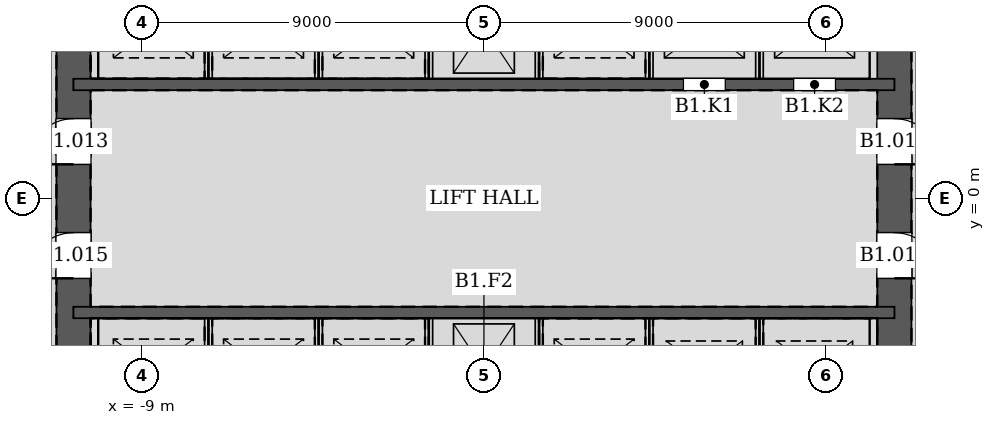
"""IFC4 building model, lengths in metres.
Left out: names, types, materials, properties, quantities, classifications, styles, units other than length and angle.
Written with IfcOpenShell. Run it as: python <this file> out.ifc"""

import sys

from ifc_helpers import new_model, si_unit, direction, frame, frame_2d, origin, place, context, subcontext, project, spatial, rectangle, extrude, element, fill, save


model = new_model("IFC4")
c1 = context("Model", 3, precision=1e-05, world=origin(), true_north=direction((0.0, 1.0)))
c2 = subcontext(c1, "Body", "Model", "MODEL_VIEW")
j1 = project(units=[si_unit("LENGTHUNIT", "METRE"), si_unit("PLANEANGLEUNIT", "RADIAN")], contexts=[c1])
p1 = place(None, origin())
s1 = spatial("IfcSite", under=j1, at=p1, CompositionType="ELEMENT")
p2 = place(p1, origin())
s2 = spatial("IfcBuilding", under=s1, at=p2, CompositionType="ELEMENT")
p3 = place(p2, frame((0.0, 0.0, -4.5)))
s3 = spatial("IfcBuildingStorey", under=s2, at=p3, CompositionType="ELEMENT", Elevation=-4.5)
p4 = place(p3, frame((10.8, -10.8, 0.0), z_axis=(0.0, 0.0, 1.0), x_axis=(0.0, 1.0, 0.0)))
e1 = element("IfcWall", 1, at=p4, inside=s3, PredefinedType="SOLIDWALL", context=c2, shape_type="SweptSolid", body=[
    extrude(rectangle(XDim=21.6, YDim=0.9, at=frame_2d((10.8, 0.0))), origin(), (0.0, 0.0, 1.0), 4.5),
])
p5 = place(p4, frame((11.7, 0.0, 0.0)))
e2 = element("IfcOpeningElement", 2, at=p5, cuts=e1, PredefinedType="OPENING", context=c2, shape_type="SweptSolid", body=[
    extrude(rectangle(XDim=1.2, YDim=2.1, at=frame_2d((0.6, 1.05))), frame((0.0, 0.46, 0.0), z_axis=(0.0, -1.0, 0.0), x_axis=(1.0, 0.0, 0.0)), (0.0, 0.0, 1.0), 0.92),
])
p6 = place(p4, frame((8.7, 0.0, 0.0)))
e3 = element("IfcOpeningElement", 3, at=p6, cuts=e1, PredefinedType="OPENING", context=c2, shape_type="SweptSolid", body=[
    extrude(rectangle(XDim=1.2, YDim=2.1, at=frame_2d((0.6, 1.05))), frame((0.0, 0.46, 0.0), z_axis=(0.0, -1.0, 0.0), x_axis=(1.0, 0.0, 0.0)), (0.0, 0.0, 1.0), 0.92),
])
p7 = place(p3, frame((-10.8, 10.8, 0.0), z_axis=(0.0, 0.0, 1.0), x_axis=(0.0, -1.0, 0.0)))
e4 = element("IfcWall", 4, at=p7, inside=s3, PredefinedType="SOLIDWALL", context=c2, shape_type="SweptSolid", body=[
    extrude(rectangle(XDim=21.6, YDim=0.9, at=frame_2d((10.8, 0.0))), origin(), (0.0, 0.0, 1.0), 4.5),
])
p8 = place(p7, frame((8.7, 0.0, 0.0)))
e5 = element("IfcOpeningElement", 5, at=p8, cuts=e4, PredefinedType="OPENING", context=c2, shape_type="SweptSolid", body=[
    extrude(rectangle(XDim=1.2, YDim=2.1, at=frame_2d((0.6, 1.05))), frame((0.0, 0.46, 0.0), z_axis=(0.0, -1.0, 0.0), x_axis=(1.0, 0.0, 0.0)), (0.0, 0.0, 1.0), 0.92),
])
p9 = place(p7, frame((11.7, 0.0, 0.0)))
e6 = element("IfcOpeningElement", 6, at=p9, cuts=e4, PredefinedType="OPENING", context=c2, shape_type="SweptSolid", body=[
    extrude(rectangle(XDim=1.2, YDim=2.1, at=frame_2d((0.6, 1.05))), frame((0.0, 0.46, 0.0), z_axis=(0.0, -1.0, 0.0), x_axis=(1.0, 0.0, 0.0)), (0.0, 0.0, 1.0), 0.92),
])
p10 = place(p3, frame((-10.8, 3.0, 0.0), z_axis=(0.0, 0.0, 1.0), x_axis=(1.0, 0.0, 0.0)))
e7 = element("IfcWall", 7, at=p10, inside=s3, PredefinedType="SOLIDWALL", context=c2, shape_type="SweptSolid", body=[
    extrude(rectangle(XDim=21.6, YDim=0.3, at=frame_2d((10.8, 0.0))), origin(), (0.0, 0.0, 1.0), 2.7),
])
p11 = place(p10, frame((16.05, 0.0, 0.0)))
e8 = element("IfcOpeningElement", 8, at=p11, cuts=e7, PredefinedType="OPENING", context=c2, shape_type="SweptSolid", body=[
    extrude(rectangle(XDim=1.1, YDim=2.1, at=frame_2d((0.55, 1.05))), frame((0.0, 0.16, 0.0), z_axis=(0.0, -1.0, 0.0), x_axis=(1.0, 0.0, 0.0)), (0.0, 0.0, 1.0), 0.32),
])
p12 = place(p10, frame((18.95, 0.0, 0.0)))
e9 = element("IfcOpeningElement", 9, at=p12, cuts=e7, PredefinedType="OPENING", context=c2, shape_type="SweptSolid", body=[
    extrude(rectangle(XDim=1.1, YDim=2.1, at=frame_2d((0.55, 1.05))), frame((0.0, 0.16, 0.0), z_axis=(0.0, -1.0, 0.0), x_axis=(1.0, 0.0, 0.0)), (0.0, 0.0, 1.0), 0.32),
])
p13 = place(p3, frame((-10.8, 3.0, 2.7), z_axis=(0.0, 0.0, 1.0), x_axis=(1.0, 0.0, 0.0)))
e10 = element("IfcWall", 10, at=p13, inside=s3, PredefinedType="SOLIDWALL", context=c2, shape_type="SweptSolid", body=[
    extrude(rectangle(XDim=21.6, YDim=0.3, at=frame_2d((10.8, 0.0))), origin(), (0.0, 0.0, 1.0), 1.8),
])
p14 = place(p3, frame((-10.8, -3.0, 0.0), z_axis=(0.0, 0.0, 1.0), x_axis=(1.0, 0.0, 0.0)))
e11 = element("IfcWall", 11, at=p14, inside=s3, PredefinedType="SOLIDWALL", context=c2, shape_type="SweptSolid", body=[
    extrude(rectangle(XDim=21.6, YDim=0.3, at=frame_2d((10.8, 0.0))), origin(), (0.0, 0.0, 1.0), 2.7),
])
p15 = place(p3, frame((-10.8, -3.0, 2.7), z_axis=(0.0, 0.0, 1.0), x_axis=(1.0, 0.0, 0.0)))
e12 = element("IfcWall", 12, at=p15, inside=s3, PredefinedType="SOLIDWALL", context=c2, shape_type="SweptSolid", body=[
    extrude(rectangle(XDim=21.6, YDim=0.3, at=frame_2d((10.8, 0.0))), origin(), (0.0, 0.0, 1.0), 1.8),
])
for number, where, z_axis, x_axis in (
    (13, (-7.25, 3.15, 0.0), (0.0, 0.0, 1.0), (0.0, 1.0, 0.0)),
    (14, (-4.35, 3.15, 0.0), (0.0, 0.0, 1.0), (0.0, 1.0, 0.0)),
    (15, (-1.45, 3.15, 0.0), (0.0, 0.0, 1.0), (0.0, 1.0, 0.0)),
    (16, (1.45, 3.15, 0.0), (0.0, 0.0, 1.0), (0.0, 1.0, 0.0)),
    (17, (4.35, 3.15, 0.0), (0.0, 0.0, 1.0), (0.0, 1.0, 0.0)),
    (18, (7.25, 3.15, 0.0), (0.0, 0.0, 1.0), (0.0, 1.0, 0.0)),
    (19, (-7.25, -5.85, 0.0), (0.0, 0.0, 1.0), (0.0, 1.0, 0.0)),
    (20, (-4.35, -5.85, 0.0), (0.0, 0.0, 1.0), (0.0, 1.0, 0.0)),
    (21, (-1.45, -5.85, 0.0), (0.0, 0.0, 1.0), (0.0, 1.0, 0.0)),
    (22, (1.45, -5.85, 0.0), (0.0, 0.0, 1.0), (0.0, 1.0, 0.0)),
    (23, (4.35, -5.85, 0.0), (0.0, 0.0, 1.0), (0.0, 1.0, 0.0)),
    (24, (7.25, -5.85, 0.0), (0.0, 0.0, 1.0), (0.0, 1.0, 0.0)),
):
    element("IfcWall", number, at=place(p3, frame(where, z_axis=z_axis, x_axis=x_axis)), inside=s3, PredefinedType="PARTITIONING", context=c2, shape_type="SweptSolid", body=[
        extrude(rectangle(XDim=2.7, YDim=0.2, at=frame_2d((1.35, 0.0))), origin(), (0.0, 0.0, 1.0), 4.5),
    ])
p16 = place(p5, frame((1.2, 0.0, 0.0), z_axis=(0.0, 0.0, 1.0), x_axis=(-1.0, 0.0, 0.0)))
e25 = element("IfcDoor", 25, at=p16, inside=s3, OperationType="SINGLE_SWING_RIGHT", PredefinedType="DOOR", context=c2, shape_type="SweptSolid", body=[
    extrude(rectangle(XDim=1.2, YDim=2.1, at=frame_2d((0.6, 1.05))), frame((0.0, 0.025, 0.0), z_axis=(0.0, -1.0, 0.0), x_axis=(1.0, 0.0, 0.0)), (0.0, 0.0, 1.0), 0.05),
])
fill(e2, e25)
p17 = place(p8, frame((1.2, 0.0, 0.0), z_axis=(0.0, 0.0, 1.0), x_axis=(-1.0, 0.0, 0.0)))
e26 = element("IfcDoor", 26, at=p17, inside=s3, OperationType="SINGLE_SWING_LEFT", PredefinedType="DOOR", context=c2, shape_type="SweptSolid", body=[
    extrude(rectangle(XDim=1.2, YDim=2.1, at=frame_2d((0.6, 1.05))), frame((0.0, 0.025, 0.0), z_axis=(0.0, -1.0, 0.0), x_axis=(1.0, 0.0, 0.0)), (0.0, 0.0, 1.0), 0.05),
])
fill(e5, e26)
p18 = place(p6, frame((1.2, 0.0, 0.0), z_axis=(0.0, 0.0, 1.0), x_axis=(-1.0, 0.0, 0.0)))
e27 = element("IfcDoor", 27, at=p18, inside=s3, OperationType="SINGLE_SWING_RIGHT", PredefinedType="DOOR", context=c2, shape_type="SweptSolid", body=[
    extrude(rectangle(XDim=1.2, YDim=2.1, at=frame_2d((0.6, 1.05))), frame((0.0, 0.025, 0.0), z_axis=(0.0, -1.0, 0.0), x_axis=(1.0, 0.0, 0.0)), (0.0, 0.0, 1.0), 0.05),
])
fill(e3, e27)
p19 = place(p9, frame((1.2, 0.0, 0.0), z_axis=(0.0, 0.0, 1.0), x_axis=(-1.0, 0.0, 0.0)))
e28 = element("IfcDoor", 28, at=p19, inside=s3, OperationType="SINGLE_SWING_LEFT", PredefinedType="DOOR", context=c2, shape_type="SweptSolid", body=[
    extrude(rectangle(XDim=1.2, YDim=2.1, at=frame_2d((0.6, 1.05))), frame((0.0, 0.025, 0.0), z_axis=(0.0, -1.0, 0.0), x_axis=(1.0, 0.0, 0.0)), (0.0, 0.0, 1.0), 0.05),
])
fill(e6, e28)
p20 = place(p11, origin())
e29 = element("IfcDoor", 29, at=p20, inside=s3, OperationType="DOUBLE_DOOR_SLIDING", PredefinedType="DOOR", context=c2, shape_type="SweptSolid", body=[
    extrude(rectangle(XDim=1.1, YDim=2.1, at=frame_2d((0.55, 1.05))), frame((0.0, 0.025, 0.0), z_axis=(0.0, -1.0, 0.0), x_axis=(1.0, 0.0, 0.0)), (0.0, 0.0, 1.0), 0.05),
])
fill(e8, e29)
p21 = place(p12, origin())
e30 = element("IfcDoor", 30, at=p21, inside=s3, OperationType="DOUBLE_DOOR_SLIDING", PredefinedType="DOOR", context=c2, shape_type="SweptSolid", body=[
    extrude(rectangle(XDim=1.1, YDim=2.1, at=frame_2d((0.55, 1.05))), frame((0.0, 0.025, 0.0), z_axis=(0.0, -1.0, 0.0), x_axis=(1.0, 0.0, 0.0)), (0.0, 0.0, 1.0), 0.05),
])
fill(e9, e30)
save(model, sys.argv[1])
